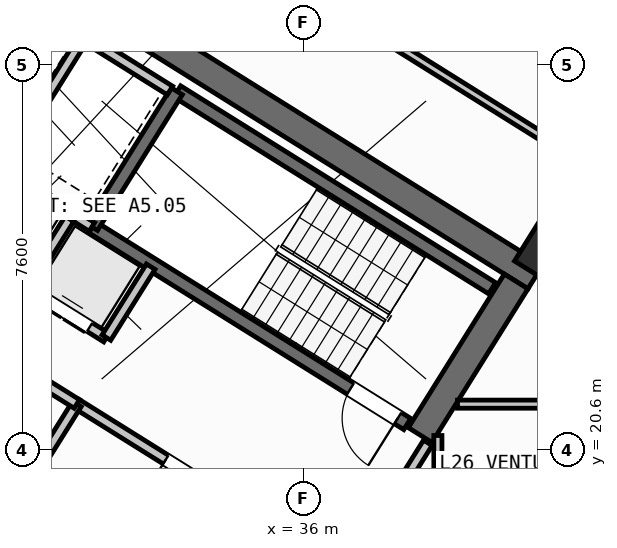
"""IFC4 building model, lengths in metres.
Left out: names, types, materials, properties, quantities, classifications, styles, units other than length and angle.
Written with IfcOpenShell. Run it as: python <this file> out.ifc"""

import sys

from ifc_helpers import new_model, si_unit, direction, frame, frame_2d, origin, origin_2d, place, context, subcontext, project, spatial, rectangle, hollow_rectangle, extrude, source, transform, mapped, element, fill, save


model = new_model("IFC4")
c1 = context("Model", 3, precision=1e-05, world=origin(), true_north=direction((0.0, 1.0)))
c2 = subcontext(c1, "Body", "Model", "MODEL_VIEW")
j1 = project(units=[si_unit("LENGTHUNIT", "METRE"), si_unit("PLANEANGLEUNIT", "RADIAN")], contexts=[c1])
p1 = place(None, origin())
s1 = spatial("IfcSite", under=j1, at=p1, CompositionType="ELEMENT")
p2 = place(p1, origin())
s2 = spatial("IfcBuilding", under=s1, at=p2, CompositionType="ELEMENT")
p3 = place(p2, frame((0.0, 0.0, 105.3)))
s3 = spatial("IfcBuildingStorey", under=s2, at=p3, CompositionType="ELEMENT", Elevation=105.3)
p4 = place(p3, frame((40.573, 24.01, 0.0), z_axis=(0.0, 0.0, 1.0), x_axis=(-0.848047359947, 0.529920442413, 0.0)))
e1 = element("IfcWall", 1, at=p4, inside=s3, PredefinedType="SHEAR", context=c2, shape_type="SweptSolid", body=[
    extrude(rectangle(XDim=13.14, YDim=0.55, at=frame_2d((6.57, 0.0))), origin(), (0.0, 0.0, 1.0), 3.35),
])
p5 = place(p3, frame((40.194, 23.922, 0.0), z_axis=(0.0, 0.0, 1.0), x_axis=(-0.529888438328, -0.848067357541, 0.0)))
e2 = element("IfcWall", 2, at=p5, inside=s3, PredefinedType="SHEAR", context=c2, shape_type="SweptSolid", body=[
    extrude(rectangle(XDim=3.575, YDim=0.55, at=frame_2d((1.788, 0.0))), origin(), (0.0, 0.0, 1.0), 3.35),
])
m1 = source(origin(), c2, "Body", "SweptSolid", [
    extrude(hollow_rectangle(XDim=0.9, YDim=0.9, WallThickness=0.036, at=origin_2d()), origin(), (0.0, 0.0, 1.0), 3.6),
])
p6 = place(p3, frame((40.783, 24.469, 0.0), z_axis=(0.0, 0.0, 1.0), x_axis=(-0.848048096156, 0.529919264233, 0.0)))
e3 = element("IfcColumn", 3, at=p6, inside=s3, PredefinedType="COLUMN", context=c2, shape_type="MappedRepresentation", body=[
    mapped(m1, transform((0.0, 0.0, 0.0), scale=1.0)),
])
p7 = place(p3, frame((31.76, 12.183, 0.0), z_axis=(0.0, 0.0, 1.0), x_axis=(-0.848047074256, 0.529920899612, 0.0)))
e4 = element("IfcWall", 4, at=p7, inside=s3, PredefinedType="STANDARD", context=c2, shape_type="SweptSolid", body=[
    extrude(rectangle(XDim=30.652, YDim=0.32, at=frame_2d((15.326, 0.0))), origin(), (0.0, 0.0, 1.0), 3.35),
])
p8 = place(p7, frame((15.153, 0.0, 0.0)))
e5 = element("IfcOpeningElement", 5, at=p8, cuts=e4, PredefinedType="OPENING", context=c2, shape_type="SweptSolid", body=[
    extrude(rectangle(XDim=1.2, YDim=2.15, at=frame_2d((0.6, 1.075))), frame((0.0, 0.17, 0.0), z_axis=(0.0, -1.0, 0.0), x_axis=(1.0, 0.0, 0.0)), (0.0, 0.0, 1.0), 0.34),
])
p9 = place(p7, frame((2.002, 0.0, 0.8)))
e6 = element("IfcOpeningElement", 6, at=p9, cuts=e4, PredefinedType="OPENING", context=c2, shape_type="SweptSolid", body=[
    extrude(rectangle(XDim=2.1, YDim=1.55, at=frame_2d((1.05, 0.775))), frame((0.0, 0.17, 0.0), z_axis=(0.0, -1.0, 0.0), x_axis=(1.0, 0.0, 0.0)), (0.0, 0.0, 1.0), 0.34),
])
p10 = place(p7, frame((7.206, 0.0, 0.8)))
e7 = element("IfcOpeningElement", 7, at=p10, cuts=e4, PredefinedType="OPENING", context=c2, shape_type="SweptSolid", body=[
    extrude(rectangle(XDim=2.1, YDim=1.55, at=frame_2d((1.05, 0.775))), frame((0.0, 0.17, 0.0), z_axis=(0.0, -1.0, 0.0), x_axis=(1.0, 0.0, 0.0)), (0.0, 0.0, 1.0), 0.34),
])
p11 = place(p7, frame((12.648, 0.0, 1.0)))
e8 = element("IfcOpeningElement", 8, at=p11, cuts=e4, PredefinedType="OPENING", context=c2, shape_type="SweptSolid", body=[
    extrude(rectangle(XDim=0.9, YDim=1.25, at=frame_2d((0.45, 0.625))), frame((0.0, 0.17, 0.0), z_axis=(0.0, -1.0, 0.0), x_axis=(1.0, 0.0, 0.0)), (0.0, 0.0, 1.0), 0.34),
])
p12 = place(p7, frame((20.628, 0.0, 0.95)))
e9 = element("IfcOpeningElement", 9, at=p12, cuts=e4, PredefinedType="OPENING", context=c2, shape_type="SweptSolid", body=[
    extrude(rectangle(XDim=1.2, YDim=1.4, at=frame_2d((0.6, 0.7))), frame((0.0, 0.17, 0.0), z_axis=(0.0, -1.0, 0.0), x_axis=(1.0, 0.0, 0.0)), (0.0, 0.0, 1.0), 0.34),
])
p13 = place(p7, frame((26.008, 0.0, 1.0)))
e10 = element("IfcOpeningElement", 10, at=p13, cuts=e4, PredefinedType="OPENING", context=c2, shape_type="SweptSolid", body=[
    extrude(rectangle(XDim=0.9, YDim=1.25, at=frame_2d((0.45, 0.625))), frame((0.0, 0.17, 0.0), z_axis=(0.0, -1.0, 0.0), x_axis=(1.0, 0.0, 0.0)), (0.0, 0.0, 1.0), 0.34),
])
p14 = place(p7, frame((28.408, 0.0, 1.0)))
e11 = element("IfcOpeningElement", 11, at=p14, cuts=e4, PredefinedType="OPENING", context=c2, shape_type="SweptSolid", body=[
    extrude(rectangle(XDim=0.9, YDim=1.25, at=frame_2d((0.45, 0.625))), frame((0.0, 0.17, 0.0), z_axis=(0.0, -1.0, 0.0), x_axis=(1.0, 0.0, 0.0)), (0.0, 0.0, 1.0), 0.34),
])
p15 = place(p3, frame((31.28, 18.261, 0.0), z_axis=(0.0, 0.0, 1.0), x_axis=(-0.848051618787, 0.529913626805, 0.0)))
e12 = element("IfcWall", 12, at=p15, inside=s3, PredefinedType="SHEAR", context=c2, shape_type="SweptSolid", body=[
    extrude(rectangle(XDim=7.46, YDim=0.26, at=frame_2d((3.73, 0.0))), origin(), (0.0, 0.0, 1.0), 3.35),
])
p16 = place(p15, frame((0.36, 0.0, 0.0)))
e13 = element("IfcOpeningElement", 13, at=p16, cuts=e12, PredefinedType="OPENING", context=c2, shape_type="SweptSolid", body=[
    extrude(rectangle(XDim=0.86, YDim=2.05, at=frame_2d((0.43, 1.025))), frame((0.0, 0.14, 0.0), z_axis=(0.0, -1.0, 0.0), x_axis=(1.0, 0.0, 0.0)), (0.0, 0.0, 1.0), 0.28),
])
p17 = place(p3, frame((39.721, 23.788, 0.0), z_axis=(0.0, 0.0, 1.0), x_axis=(-0.848054434086, 0.529909121291, 0.0)))
e14 = element("IfcWall", 14, at=p17, inside=s3, PredefinedType="SHEAR", context=c2, shape_type="SweptSolid", body=[
    extrude(rectangle(XDim=7.33, YDim=0.26, at=frame_2d((3.665, 0.0))), origin(), (0.0, 0.0, 1.0), 3.35),
])
p18 = place(p3, frame((38.046, 21.108, 0.0), z_axis=(0.0, 0.0, 1.0), x_axis=(-0.848054434086, 0.529909121291, 0.0)))
e15 = element("IfcWall", 15, at=p18, inside=s3, PredefinedType="SHEAR", context=c2, shape_type="SweptSolid", body=[
    extrude(rectangle(XDim=7.33, YDim=0.26, at=frame_2d((3.665, 0.0))), origin(), (0.0, 0.0, 1.0), 3.35),
])
p19 = place(p18, frame((0.22, 0.0, 0.0)))
e16 = element("IfcOpeningElement", 16, at=p19, cuts=e15, PredefinedType="OPENING", context=c2, shape_type="SweptSolid", body=[
    extrude(rectangle(XDim=1.1, YDim=2.1, at=frame_2d((0.55, 1.05))), frame((0.0, 0.14, 0.0), z_axis=(0.0, -1.0, 0.0), x_axis=(1.0, 0.0, 0.0)), (0.0, 0.0, 1.0), 0.28),
])
p20 = place(p3, frame((33.496, 27.677, 0.0), z_axis=(0.0, 0.0, 1.0), x_axis=(-0.529908658664, -0.84805472316, 0.0)))
e17 = element("IfcWall", 17, at=p20, inside=s3, PredefinedType="SHEAR", context=c2, shape_type="SweptSolid", body=[
    extrude(rectangle(XDim=3.16, YDim=0.26, at=frame_2d((1.58, 0.0))), origin(), (0.0, 0.0, 1.0), 3.35),
])
p21 = place(p3, frame((36.417, 18.447, 0.0), z_axis=(0.0, 0.0, 1.0), x_axis=(-0.848064879198, 0.529892404805, 0.0)))
e18 = element("IfcWall", 18, at=p21, inside=s3, PredefinedType="STANDARD", context=c2, shape_type="SweptSolid", body=[
    extrude(rectangle(XDim=5.768, YDim=0.2, at=frame_2d((2.884, 0.0))), origin(), (0.0, 0.0, 1.0), 3.34),
])
p22 = place(p21, frame((2.548, 0.0, 0.0)))
e19 = element("IfcOpeningElement", 19, at=p22, cuts=e18, PredefinedType="OPENING", context=c2, shape_type="SweptSolid", body=[
    extrude(rectangle(XDim=1.15, YDim=2.1, at=frame_2d((0.575, 1.05))), frame((0.0, 0.11, 0.0), z_axis=(0.0, -1.0, 0.0), x_axis=(1.0, 0.0, 0.0)), (0.0, 0.0, 1.0), 0.22),
])
p23 = place(p3, frame((31.822, 24.998, 0.0), z_axis=(0.0, 0.0, 1.0), x_axis=(-0.848036912365, 0.52993716162, 0.0)))
e20 = element("IfcWall", 20, at=p23, inside=s3, PredefinedType="STANDARD", context=c2, shape_type="SweptSolid", body=[
    extrude(rectangle(XDim=4.618, YDim=0.2, at=frame_2d((2.309, 0.0))), origin(), (0.0, 0.0, 1.0), 3.34),
])
p24 = place(p3, frame((32.108, 22.814, 0.0), z_axis=(0.0, 0.0, 1.0), x_axis=(-0.848042229521, 0.529928652696, 0.0)))
e21 = element("IfcWall", 21, at=p24, inside=s3, PredefinedType="STANDARD", context=c2, shape_type="SweptSolid", body=[
    extrude(rectangle(XDim=5.62, YDim=0.2, at=frame_2d((2.81, 0.0))), origin(), (0.0, 0.0, 1.0), 3.34),
])
p25 = place(p24, frame((0.39, 0.0, 0.0)))
e22 = element("IfcOpeningElement", 22, at=p25, cuts=e21, PredefinedType="OPENING", context=c2, shape_type="SweptSolid", body=[
    extrude(rectangle(XDim=1.1, YDim=2.15, at=frame_2d((0.55, 1.075))), frame((0.0, 0.11, 0.0), z_axis=(0.0, -1.0, 0.0), x_axis=(1.0, 0.0, 0.0)), (0.0, 0.0, 1.0), 0.22),
])
p26 = place(p24, frame((2.25, 0.0, 0.0)))
e23 = element("IfcOpeningElement", 23, at=p26, cuts=e21, PredefinedType="OPENING", context=c2, shape_type="SweptSolid", body=[
    extrude(rectangle(XDim=1.1, YDim=2.15, at=frame_2d((0.55, 1.075))), frame((0.0, 0.11, 0.0), z_axis=(0.0, -1.0, 0.0), x_axis=(1.0, 0.0, 0.0)), (0.0, 0.0, 1.0), 0.22),
])
p27 = place(p24, frame((4.11, 0.0, 0.0)))
e24 = element("IfcOpeningElement", 24, at=p27, cuts=e21, PredefinedType="OPENING", context=c2, shape_type="SweptSolid", body=[
    extrude(rectangle(XDim=1.1, YDim=2.15, at=frame_2d((0.55, 1.075))), frame((0.0, 0.11, 0.0), z_axis=(0.0, -1.0, 0.0), x_axis=(1.0, 0.0, 0.0)), (0.0, 0.0, 1.0), 0.22),
])
p28 = place(p3, frame((32.982, 24.213, 0.0), z_axis=(0.0, 0.0, 1.0), x_axis=(-0.529839334948, -0.84809803628, 0.0)))
e25 = element("IfcWall", 25, at=p28, inside=s3, PredefinedType="STANDARD", context=c2, shape_type="SweptSolid", body=[
    extrude(rectangle(XDim=1.65, YDim=0.2, at=frame_2d((0.825, 0.0))), origin(), (0.0, 0.0, 1.0), 3.34),
])
p29 = place(p3, frame((31.645, 28.716, 0.0), z_axis=(0.0, 0.0, 1.0), x_axis=(-0.52986693015, -0.848080795876, 0.0)))
e26 = element("IfcWall", 26, at=p29, inside=s3, PredefinedType="STANDARD", context=c2, shape_type="SweptSolid", body=[
    extrude(rectangle(XDim=2.66, YDim=0.2, at=frame_2d((1.33, 0.0))), origin(), (0.0, 0.0, 1.0), 3.34),
])
p30 = place(p3, frame((33.363, 27.69, 0.0), z_axis=(0.0, 0.0, 1.0), x_axis=(-0.848047090064, 0.529920874315, 0.0)))
e27 = element("IfcWall", 27, at=p30, inside=s3, PredefinedType="STANDARD", context=c2, shape_type="SweptSolid", body=[
    extrude(rectangle(XDim=4.498, YDim=0.2, at=frame_2d((2.249, 0.0))), origin(), (0.0, 0.0, 1.0), 3.34),
])
p31 = place(p3, frame((31.379, 25.156, 0.0), z_axis=(0.0, 0.0, 1.0), x_axis=(-0.529998940003, -0.847998304005, 0.0)))
e28 = element("IfcWall", 28, at=p31, inside=s3, PredefinedType="STANDARD", context=c2, shape_type="SweptSolid", body=[
    extrude(rectangle(XDim=1.58, YDim=0.2, at=frame_2d((0.79, 0.0))), origin(), (0.0, 0.0, 1.0), 3.34),
])
p32 = place(p3, frame((31.525, 21.504, 0.0), z_axis=(0.0, 0.0, 1.0), x_axis=(-0.529907497854, -0.848055448493, 0.0)))
e29 = element("IfcWall", 29, at=p32, inside=s3, PredefinedType="STANDARD", context=c2, shape_type="SweptSolid", body=[
    extrude(rectangle(XDim=2.88, YDim=0.2, at=frame_2d((1.44, 0.0))), origin(), (0.0, 0.0, 1.0), 3.34),
])
p33 = place(p3, frame((31.525, 21.504, 0.0), z_axis=(0.0, 0.0, 1.0), x_axis=(-0.848040211232, 0.529931882541, 0.0)))
e30 = element("IfcWall", 30, at=p33, inside=s3, PredefinedType="STANDARD", context=c2, shape_type="SweptSolid", body=[
    extrude(rectangle(XDim=6.218, YDim=0.2, at=frame_2d((3.109, 0.0))), origin(), (0.0, 0.0, 1.0), 3.34),
])
p34 = place(p33, frame((4.4, 0.0, 0.0)))
e31 = element("IfcOpeningElement", 31, at=p34, cuts=e30, PredefinedType="OPENING", context=c2, shape_type="SweptSolid", body=[
    extrude(rectangle(XDim=0.86, YDim=2.05, at=frame_2d((0.43, 1.025))), frame((0.0, 0.11, 0.0), z_axis=(0.0, -1.0, 0.0), x_axis=(1.0, 0.0, 0.0)), (0.0, 0.0, 1.0), 0.22),
])
p35 = place(p33, frame((1.45, 0.0, 0.0)))
e32 = element("IfcOpeningElement", 32, at=p35, cuts=e30, PredefinedType="OPENING", context=c2, shape_type="SweptSolid", body=[
    extrude(rectangle(XDim=0.86, YDim=2.05, at=frame_2d((0.43, 1.025))), frame((0.0, 0.11, 0.0), z_axis=(0.0, -1.0, 0.0), x_axis=(1.0, 0.0, 0.0)), (0.0, 0.0, 1.0), 0.22),
])
p36 = place(p3, frame((31.239, 38.274, 0.0), z_axis=(0.0, 0.0, 1.0), x_axis=(-0.529918119251, -0.84804881162, 0.0)))
e33 = element("IfcWall", 33, at=p36, inside=s3, PredefinedType="PARTITIONING", context=c2, shape_type="SweptSolid", body=[
    extrude(rectangle(XDim=17.65, YDim=0.16, at=frame_2d((8.825, 0.0))), origin(), (0.0, 0.0, 1.0), 3.34),
])
p37 = place(p3, frame((41.936, 26.012, 0.0), z_axis=(0.0, 0.0, 1.0), x_axis=(-0.848051154596, 0.529914369676, 0.0)))
e34 = element("IfcWall", 34, at=p37, inside=s3, PredefinedType="PARTITIONING", context=c2, shape_type="SweptSolid", body=[
    extrude(rectangle(XDim=15.57, YDim=0.16, at=frame_2d((7.785, 0.0))), origin(), (0.0, 0.0, 1.0), 3.34),
])
p38 = place(p37, frame((10.83, 0.0, 0.0)))
e35 = element("IfcOpeningElement", 35, at=p38, cuts=e34, PredefinedType="OPENING", context=c2, shape_type="SweptSolid", body=[
    extrude(rectangle(XDim=1.0, YDim=2.1, at=frame_2d((0.5, 1.05))), frame((0.0, 0.09, 0.0), z_axis=(0.0, -1.0, 0.0), x_axis=(1.0, 0.0, 0.0)), (0.0, 0.0, 1.0), 0.18),
])
p39 = place(p3, frame((38.451, 20.737, 0.0), z_axis=(0.0, 0.0, 1.0), x_axis=(-0.529924799939, -0.848044637038, 0.0)))
e36 = element("IfcWall", 36, at=p39, inside=s3, PredefinedType="STANDARD", context=c2, shape_type="SweptSolid", body=[
    extrude(rectangle(XDim=2.96, YDim=0.2, at=frame_2d((1.48, 0.0))), origin(), (0.0, 0.0, 1.0), 3.34),
])
p40 = place(p39, frame((1.46, 0.0, 0.0)))
e37 = element("IfcOpeningElement", 37, at=p40, cuts=e36, PredefinedType="OPENING", context=c2, shape_type="SweptSolid", body=[
    extrude(rectangle(XDim=0.86, YDim=2.05, at=frame_2d((0.43, 1.025))), frame((0.0, 0.11, 0.0), z_axis=(0.0, -1.0, 0.0), x_axis=(1.0, 0.0, 0.0)), (0.0, 0.0, 1.0), 0.22),
])
p41 = place(p3, frame((38.65, 17.93, 0.0), z_axis=(0.0, 0.0, 1.0), x_axis=(0.0, 1.0, 0.0)))
e38 = element("IfcWall", 38, at=p41, inside=s3, PredefinedType="PARTITIONING", context=c2, shape_type="SweptSolid", body=[
    extrude(rectangle(XDim=2.951, YDim=0.16, at=frame_2d((1.476, 0.0))), origin(), (0.0, 0.0, 1.0), 3.34),
])
p42 = place(p3, frame((39.037, 21.5, 0.0), z_axis=(0.0, 0.0, 1.0), x_axis=(1.0, 0.0, 0.0)))
e39 = element("IfcWall", 39, at=p42, inside=s3, PredefinedType="PARTITIONING", context=c2, shape_type="SweptSolid", body=[
    extrude(rectangle(XDim=7.215, YDim=0.16, at=frame_2d((3.607, 0.0))), origin(), (0.0, 0.0, 1.0), 3.34),
])
m2 = source(origin(), c2, "Body", "SweptSolid", [
    extrude(rectangle(XDim=1.1, YDim=2.1, at=frame_2d((0.55, 1.05))), frame((0.0, 0.025, 0.0), z_axis=(0.0, -1.0, 0.0), x_axis=(1.0, 0.0, 0.0)), (0.0, 0.0, 1.0), 0.05),
])
p43 = place(p19, origin())
e40 = element("IfcDoor", 40, at=p43, inside=s3, OperationType="SINGLE_SWING_LEFT", PredefinedType="DOOR", context=c2, shape_type="MappedRepresentation", body=[
    mapped(m2, transform((0.0, 0.0, 0.0), scale=1.0)),
])
fill(e16, e40)
m3 = source(origin(), c2, "Body", "SweptSolid", [
    extrude(rectangle(XDim=1.15, YDim=2.1, at=frame_2d((0.575, 1.05))), frame((0.0, 0.025, 0.0), z_axis=(0.0, -1.0, 0.0), x_axis=(1.0, 0.0, 0.0)), (0.0, 0.0, 1.0), 0.05),
])
p44 = place(p22, origin())
e41 = element("IfcDoor", 41, at=p44, inside=s3, OperationType="SINGLE_SWING_RIGHT", PredefinedType="DOOR", context=c2, shape_type="MappedRepresentation", body=[
    mapped(m3, transform((0.0, 0.0, 0.0), scale=1.0)),
])
fill(e19, e41)
m4 = source(origin(), c2, "Body", "SweptSolid", [
    extrude(rectangle(XDim=1.1, YDim=2.15, at=frame_2d((0.55, 1.075))), frame((0.0, 0.025, 0.0), z_axis=(0.0, -1.0, 0.0), x_axis=(1.0, 0.0, 0.0)), (0.0, 0.0, 1.0), 0.05),
])
p45 = place(p25, origin())
e42 = element("IfcDoor", 42, at=p45, inside=s3, OperationType="DOUBLE_DOOR_SLIDING", PredefinedType="DOOR", context=c2, shape_type="MappedRepresentation", body=[
    mapped(m4, transform((0.0, 0.0, 0.0), scale=1.0)),
])
fill(e22, e42)
save(model, sys.argv[1])
